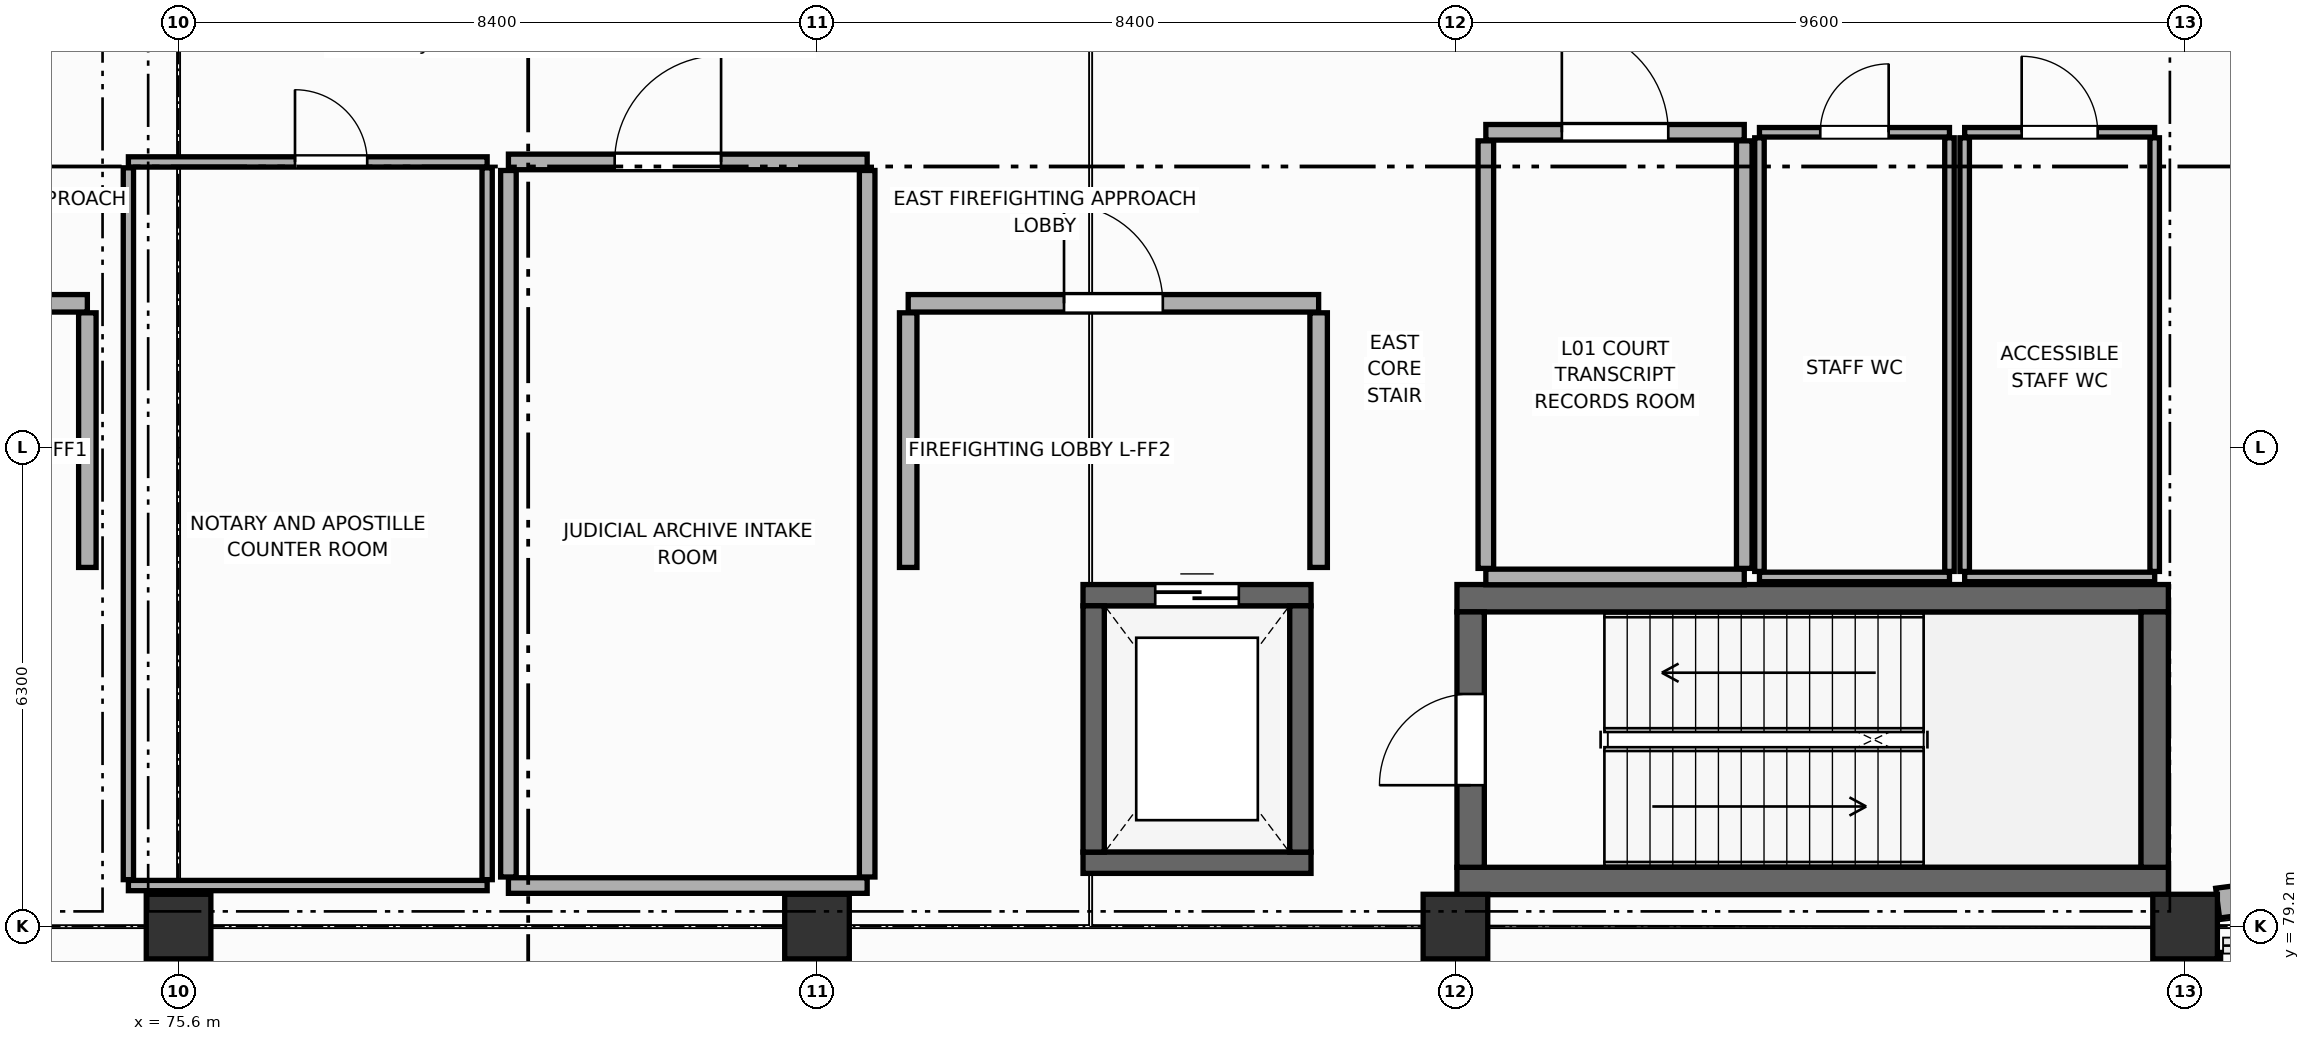
"""IFC4 building model, lengths in metres.
Left out: names, types, materials, properties, quantities, classifications, styles, units other than length and angle.
Written with IfcOpenShell. Run it as: python <this file> out.ifc"""

import sys

from ifc_helpers import new_model, si_unit, direction, frame, frame_2d, origin, origin_2d, place, context, subcontext, project, spatial, rectangle, extrude, element, fill, save


model = new_model("IFC4")
c1 = context("Model", 3, precision=1e-05, world=origin(), true_north=direction((0.0, 1.0)))
c2 = subcontext(c1, "Body", "Model", "MODEL_VIEW")
j1 = project(units=[si_unit("LENGTHUNIT", "METRE"), si_unit("PLANEANGLEUNIT", "RADIAN")], contexts=[c1])
p1 = place(None, origin())
s1 = spatial("IfcSite", under=j1, at=p1, CompositionType="ELEMENT")
p2 = place(p1, origin())
s2 = spatial("IfcBuilding", under=s1, at=p2, CompositionType="ELEMENT")
p3 = place(p2, origin())
s3 = spatial("IfcBuildingStorey", under=s2, at=p3, CompositionType="ELEMENT", Elevation=0.0)
for number, where, z_axis, x_axis in (
    (1, (75.6, 79.2, 0.0), (0.0, 0.0, 1.0), (1.0, 0.0, 0.0)),
    (2, (84.0, 79.2, 0.0), (0.0, 0.0, 1.0), (1.0, 0.0, 0.0)),
    (3, (92.4, 79.2, 0.0), (0.0, 0.0, 1.0), (1.0, 0.0, 0.0)),
    (4, (102.0, 79.2, 0.0), (0.0, 0.0, 1.0), (1.0, 0.0, 0.0)),
):
    element("IfcColumn", number, at=place(p3, frame(where, z_axis=z_axis, x_axis=x_axis)), inside=s3, PredefinedType="COLUMN", context=c2, shape_type="SweptSolid", body=[
        extrude(rectangle(XDim=0.85, YDim=0.85, at=origin_2d()), origin(), (0.0, 0.0, 1.0), 5.4),
    ])
p4 = place(p3, frame((102.428, 79.509, 0.0), z_axis=(0.0, 0.0, 1.0), x_axis=(0.991443994311, 0.130532778046, 0.0)))
e5 = element("IfcWall", 5, at=p4, inside=s3, PredefinedType="ELEMENTEDWALL", context=c2, shape_type="SweptSolid", body=[
    extrude(rectangle(XDim=2.824, YDim=0.395, at=frame_2d((1.412, 0.0))), origin(), (0.0, 0.0, 1.0), 4.27),
])
p5 = place(p4, frame((0.962, 0.0, 0.85)))
e6 = element("IfcOpeningElement", 6, at=p5, cuts=e5, PredefinedType="OPENING", context=c2, shape_type="SweptSolid", body=[
    extrude(rectangle(XDim=0.9, YDim=1.85, at=frame_2d((0.45, 0.925))), frame((0.0, 0.208, 0.0), z_axis=(0.0, -1.0, 0.0), x_axis=(1.0, 0.0, 0.0)), (0.0, 0.0, 1.0), 0.415),
])
for number, where, z_axis, x_axis in (
    (7, (92.42, 83.52, 0.0), (0.0, 0.0, 1.0), (1.0, 0.0, 0.0)),
    (8, (101.78, 79.8, 0.0), (0.0, 0.0, 1.0), (-1.0, 0.0, 0.0)),
):
    element("IfcWall", number, at=place(p3, frame(where, z_axis=z_axis, x_axis=x_axis)), inside=s3, PredefinedType="SHEAR", context=c2, shape_type="SweptSolid", body=[
        extrude(rectangle(XDim=9.36, YDim=0.36, at=frame_2d((4.68, 0.0))), origin(), (0.0, 0.0, 1.0), 5.14),
    ])
p6 = place(p3, frame((92.6, 79.98, 0.0), z_axis=(0.0, 0.0, 1.0), x_axis=(0.0, 1.0, 0.0)))
e9 = element("IfcWall", 9, at=p6, inside=s3, PredefinedType="SHEAR", context=c2, shape_type="SweptSolid", body=[
    extrude(rectangle(XDim=3.36, YDim=0.36, at=frame_2d((1.68, 0.0))), origin(), (0.0, 0.0, 1.0), 5.14),
])
p7 = place(p6, frame((1.08, 0.0, 0.0)))
e10 = element("IfcOpeningElement", 10, at=p7, cuts=e9, PredefinedType="OPENING", context=c2, shape_type="SweptSolid", body=[
    extrude(rectangle(XDim=1.2, YDim=2.2, at=frame_2d((0.6, 1.1))), frame((0.0, 0.19, 0.0), z_axis=(0.0, -1.0, 0.0), x_axis=(1.0, 0.0, 0.0)), (0.0, 0.0, 1.0), 0.38),
])
p8 = place(p3, frame((101.6, 83.34, 0.0), z_axis=(0.0, 0.0, 1.0), x_axis=(0.0, -1.0, 0.0)))
e11 = element("IfcWall", 11, at=p8, inside=s3, PredefinedType="SHEAR", context=c2, shape_type="SweptSolid", body=[
    extrude(rectangle(XDim=3.36, YDim=0.36, at=frame_2d((1.68, 0.0))), origin(), (0.0, 0.0, 1.0), 5.14),
])
p9 = place(p3, frame((87.5, 83.56, 0.0), z_axis=(0.0, 0.0, 1.0), x_axis=(1.0, 0.0, 0.0)))
e12 = element("IfcWall", 12, at=p9, inside=s3, PredefinedType="SHEAR", context=c2, shape_type="SweptSolid", body=[
    extrude(rectangle(XDim=3.0, YDim=0.28, at=frame_2d((1.5, 0.0))), origin(), (0.0, 0.0, 1.0), 5.14),
])
p10 = place(p9, frame((0.95, 0.0, 0.0)))
e13 = element("IfcOpeningElement", 13, at=p10, cuts=e12, PredefinedType="OPENING", context=c2, shape_type="SweptSolid", body=[
    extrude(rectangle(XDim=1.1, YDim=2.2, at=frame_2d((0.55, 1.1))), frame((0.0, 0.15, 0.0), z_axis=(0.0, -1.0, 0.0), x_axis=(1.0, 0.0, 0.0)), (0.0, 0.0, 1.0), 0.3),
])
p11 = place(p3, frame((90.5, 80.04, 0.0), z_axis=(0.0, 0.0, 1.0), x_axis=(-1.0, 0.0, 0.0)))
e14 = element("IfcWall", 14, at=p11, inside=s3, PredefinedType="SHEAR", context=c2, shape_type="SweptSolid", body=[
    extrude(rectangle(XDim=3.0, YDim=0.28, at=frame_2d((1.5, 0.0))), origin(), (0.0, 0.0, 1.0), 5.14),
])
for number, where, z_axis, x_axis in (
    (15, (87.64, 80.18, 0.0), (0.0, 0.0, 1.0), (0.0, 1.0, 0.0)),
    (16, (90.36, 83.42, 0.0), (0.0, 0.0, 1.0), (0.0, -1.0, 0.0)),
):
    element("IfcWall", number, at=place(p3, frame(where, z_axis=z_axis, x_axis=x_axis)), inside=s3, PredefinedType="SHEAR", context=c2, shape_type="SweptSolid", body=[
        extrude(rectangle(XDim=3.24, YDim=0.28, at=frame_2d((1.62, 0.0))), origin(), (0.0, 0.0, 1.0), 5.14),
    ])
p12 = place(p3, frame((69.0, 87.4, 0.0), z_axis=(0.0, 0.0, 1.0), x_axis=(1.0, 0.0, 0.0)))
e17 = element("IfcWall", 17, at=p12, inside=s3, PredefinedType="STANDARD", context=c2, shape_type="SweptSolid", body=[
    extrude(rectangle(XDim=5.4, YDim=0.23, at=frame_2d((2.7, 0.0))), origin(), (0.0, 0.0, 1.0), 5.125),
])
p13 = place(p12, frame((2.05, 0.0, 0.0)))
e18 = element("IfcOpeningElement", 18, at=p13, cuts=e17, PredefinedType="OPENING", context=c2, shape_type="SweptSolid", body=[
    extrude(rectangle(XDim=1.3, YDim=2.2, at=frame_2d((0.65, 1.1))), frame((0.0, 0.125, 0.0), z_axis=(0.0, -1.0, 0.0), x_axis=(1.0, 0.0, 0.0)), (0.0, 0.0, 1.0), 0.25),
])
p14 = place(p3, frame((74.4, 87.275, 0.0), z_axis=(0.0, 0.0, 1.0), x_axis=(0.0, -1.0, 0.0)))
e19 = element("IfcWall", 19, at=p14, inside=s3, PredefinedType="STANDARD", context=c2, shape_type="SweptSolid", body=[
    extrude(rectangle(XDim=3.35, YDim=0.23, at=frame_2d((1.675, 0.0))), origin(), (0.0, 0.0, 1.0), 5.125),
])
p15 = place(p3, frame((85.2, 87.4, 0.0), z_axis=(0.0, 0.0, 1.0), x_axis=(1.0, 0.0, 0.0)))
e20 = element("IfcWall", 20, at=p15, inside=s3, PredefinedType="STANDARD", context=c2, shape_type="SweptSolid", body=[
    extrude(rectangle(XDim=5.4, YDim=0.23, at=frame_2d((2.7, 0.0))), origin(), (0.0, 0.0, 1.0), 4.52),
])
p16 = place(p15, frame((2.05, 0.0, 0.0)))
e21 = element("IfcOpeningElement", 21, at=p16, cuts=e20, PredefinedType="OPENING", context=c2, shape_type="SweptSolid", body=[
    extrude(rectangle(XDim=1.3, YDim=2.2, at=frame_2d((0.65, 1.1))), frame((0.0, 0.125, 0.0), z_axis=(0.0, -1.0, 0.0), x_axis=(1.0, 0.0, 0.0)), (0.0, 0.0, 1.0), 0.25),
])
for number, where, z_axis, x_axis in (
    (22, (85.2, 83.925, 0.0), (0.0, 0.0, 1.0), (0.0, 1.0, 0.0)),
    (23, (90.6, 87.275, 0.0), (0.0, 0.0, 1.0), (0.0, -1.0, 0.0)),
):
    element("IfcWall", number, at=place(p3, frame(where, z_axis=z_axis, x_axis=x_axis)), inside=s3, PredefinedType="STANDARD", context=c2, shape_type="SweptSolid", body=[
        extrude(rectangle(XDim=3.35, YDim=0.23, at=frame_2d((1.675, 0.0))), origin(), (0.0, 0.0, 1.0), 4.52),
    ])
p17 = place(p3, frame((96.4, 89.65, 0.0), z_axis=(0.0, 0.0, 1.0), x_axis=(1.0, 0.0, 0.0)))
e24 = element("IfcWall", 24, at=p17, inside=s3, PredefinedType="PARTITIONING", context=c2, shape_type="SweptSolid", body=[
    extrude(rectangle(XDim=2.5, YDim=0.125, at=frame_2d((1.25, 0.0))), origin(), (0.0, 0.0, 1.0), 5.125),
])
p18 = place(p17, frame((0.8, 0.0, 0.0)))
e25 = element("IfcOpeningElement", 25, at=p18, cuts=e24, PredefinedType="OPENING", context=c2, shape_type="SweptSolid", body=[
    extrude(rectangle(XDim=0.9, YDim=2.1, at=frame_2d((0.45, 1.05))), frame((0.0, 0.073, 0.0), z_axis=(0.0, -1.0, 0.0), x_axis=(1.0, 0.0, 0.0)), (0.0, 0.0, 1.0), 0.145),
])
p19 = place(p3, frame((98.9, 83.8, 0.0), z_axis=(0.0, 0.0, 1.0), x_axis=(-1.0, 0.0, 0.0)))
e26 = element("IfcWall", 26, at=p19, inside=s3, PredefinedType="PARTITIONING", context=c2, shape_type="SweptSolid", body=[
    extrude(rectangle(XDim=2.5, YDim=0.125, at=frame_2d((1.25, 0.0))), origin(), (0.0, 0.0, 1.0), 5.125),
])
for number, where, z_axis, x_axis in (
    (27, (96.4, 83.873, 0.0), (0.0, 0.0, 1.0), (0.0, 1.0, 0.0)),
    (28, (98.9, 89.577, 0.0), (0.0, 0.0, 1.0), (0.0, -1.0, 0.0)),
):
    element("IfcWall", number, at=place(p3, frame(where, z_axis=z_axis, x_axis=x_axis)), inside=s3, PredefinedType="PARTITIONING", context=c2, shape_type="SweptSolid", body=[
        extrude(rectangle(XDim=5.705, YDim=0.125, at=frame_2d((2.853, 0.0))), origin(), (0.0, 0.0, 1.0), 4.52),
    ])
p20 = place(p3, frame((99.1, 89.65, 0.0), z_axis=(0.0, 0.0, 1.0), x_axis=(1.0, 0.0, 0.0)))
e29 = element("IfcWall", 29, at=p20, inside=s3, PredefinedType="PARTITIONING", context=c2, shape_type="SweptSolid", body=[
    extrude(rectangle(XDim=2.5, YDim=0.125, at=frame_2d((1.25, 0.0))), origin(), (0.0, 0.0, 1.0), 4.27),
])
p21 = place(p20, frame((0.75, 0.0, 0.0)))
e30 = element("IfcOpeningElement", 30, at=p21, cuts=e29, PredefinedType="OPENING", context=c2, shape_type="SweptSolid", body=[
    extrude(rectangle(XDim=1.0, YDim=2.1, at=frame_2d((0.5, 1.05))), frame((0.0, 0.073, 0.0), z_axis=(0.0, -1.0, 0.0), x_axis=(1.0, 0.0, 0.0)), (0.0, 0.0, 1.0), 0.145),
])
p22 = place(p3, frame((101.6, 83.8, 0.0), z_axis=(0.0, 0.0, 1.0), x_axis=(-1.0, 0.0, 0.0)))
e31 = element("IfcWall", 31, at=p22, inside=s3, PredefinedType="PARTITIONING", context=c2, shape_type="SweptSolid", body=[
    extrude(rectangle(XDim=2.5, YDim=0.125, at=frame_2d((1.25, 0.0))), origin(), (0.0, 0.0, 1.0), 4.27),
])
p23 = place(p3, frame((99.1, 83.873, 0.0), z_axis=(0.0, 0.0, 1.0), x_axis=(0.0, 1.0, 0.0)))
e32 = element("IfcWall", 32, at=p23, inside=s3, PredefinedType="PARTITIONING", context=c2, shape_type="SweptSolid", body=[
    extrude(rectangle(XDim=5.705, YDim=0.125, at=frame_2d((2.853, 0.0))), origin(), (0.0, 0.0, 1.0), 4.52),
])
p24 = place(p3, frame((101.6, 89.577, 0.0), z_axis=(0.0, 0.0, 1.0), x_axis=(0.0, -1.0, 0.0)))
e33 = element("IfcWall", 33, at=p24, inside=s3, PredefinedType="PARTITIONING", context=c2, shape_type="SweptSolid", body=[
    extrude(rectangle(XDim=5.705, YDim=0.125, at=frame_2d((2.853, 0.0))), origin(), (0.0, 0.0, 1.0), 4.27),
])
p25 = place(p3, frame((92.8, 89.65, 0.0), z_axis=(0.0, 0.0, 1.0), x_axis=(1.0, 0.0, 0.0)))
e34 = element("IfcWall", 34, at=p25, inside=s3, PredefinedType="STANDARD", context=c2, shape_type="SweptSolid", body=[
    extrude(rectangle(XDim=3.4, YDim=0.205, at=frame_2d((1.7, 0.0))), origin(), (0.0, 0.0, 1.0), 4.27),
])
p26 = place(p25, frame((1.0, 0.0, 0.0)))
e35 = element("IfcOpeningElement", 35, at=p26, cuts=e34, PredefinedType="OPENING", context=c2, shape_type="SweptSolid", body=[
    extrude(rectangle(XDim=1.4, YDim=2.25, at=frame_2d((0.7, 1.125))), frame((0.0, 0.113, 0.0), z_axis=(0.0, -1.0, 0.0), x_axis=(1.0, 0.0, 0.0)), (0.0, 0.0, 1.0), 0.225),
])
p27 = place(p3, frame((96.2, 83.8, 0.0), z_axis=(0.0, 0.0, 1.0), x_axis=(-1.0, 0.0, 0.0)))
e36 = element("IfcWall", 36, at=p27, inside=s3, PredefinedType="STANDARD", context=c2, shape_type="SweptSolid", body=[
    extrude(rectangle(XDim=3.4, YDim=0.205, at=frame_2d((1.7, 0.0))), origin(), (0.0, 0.0, 1.0), 4.27),
])
p28 = place(p3, frame((92.8, 83.913, 0.0), z_axis=(0.0, 0.0, 1.0), x_axis=(0.0, 1.0, 0.0)))
e37 = element("IfcWall", 37, at=p28, inside=s3, PredefinedType="STANDARD", context=c2, shape_type="SweptSolid", body=[
    extrude(rectangle(XDim=5.625, YDim=0.205, at=frame_2d((2.812, 0.0))), origin(), (0.0, 0.0, 1.0), 4.27),
])
p29 = place(p3, frame((96.2, 89.538, 0.0), z_axis=(0.0, 0.0, 1.0), x_axis=(0.0, -1.0, 0.0)))
e38 = element("IfcWall", 38, at=p29, inside=s3, PredefinedType="STANDARD", context=c2, shape_type="SweptSolid", body=[
    extrude(rectangle(XDim=5.625, YDim=0.205, at=frame_2d((2.812, 0.0))), origin(), (0.0, 0.0, 1.0), 4.52),
])
p30 = place(p3, frame((102.4, 70.877, 0.0), z_axis=(0.0, 0.0, 1.0), x_axis=(0.0, 1.0, 0.0)))
e39 = element("IfcWall", 39, at=p30, inside=s3, PredefinedType="PARTITIONING", context=c2, shape_type="SweptSolid", body=[
    extrude(rectangle(XDim=7.983, YDim=0.135, at=frame_2d((3.991, 0.0))), origin(), (0.0, 0.0, 1.0), 4.23),
])
p31 = place(p3, frame((74.94, 89.26, 0.0), z_axis=(0.0, 0.0, 1.0), x_axis=(1.0, 0.0, 0.0)))
e40 = element("IfcWall", 40, at=p31, inside=s3, PredefinedType="PARTITIONING", context=c2, shape_type="SweptSolid", body=[
    extrude(rectangle(XDim=4.72, YDim=0.135, at=frame_2d((2.36, 0.0))), origin(), (0.0, 0.0, 1.0), 4.27),
])
p32 = place(p31, frame((2.192, 0.0, 0.0)))
e41 = element("IfcOpeningElement", 41, at=p32, cuts=e40, PredefinedType="OPENING", context=c2, shape_type="SweptSolid", body=[
    extrude(rectangle(XDim=0.95, YDim=2.15, at=frame_2d((0.475, 1.075))), frame((0.0, 0.077, 0.0), z_axis=(0.0, -1.0, 0.0), x_axis=(1.0, 0.0, 0.0)), (0.0, 0.0, 1.0), 0.155),
])
p33 = place(p3, frame((79.66, 79.74, 0.0), z_axis=(0.0, 0.0, 1.0), x_axis=(-1.0, 0.0, 0.0)))
e42 = element("IfcWall", 42, at=p33, inside=s3, PredefinedType="PARTITIONING", context=c2, shape_type="SweptSolid", body=[
    extrude(rectangle(XDim=4.72, YDim=0.135, at=frame_2d((2.36, 0.0))), origin(), (0.0, 0.0, 1.0), 4.27),
])
p34 = place(p3, frame((74.94, 79.817, 0.0), z_axis=(0.0, 0.0, 1.0), x_axis=(0.0, 1.0, 0.0)))
e43 = element("IfcWall", 43, at=p34, inside=s3, PredefinedType="PARTITIONING", context=c2, shape_type="SweptSolid", body=[
    extrude(rectangle(XDim=9.365, YDim=0.135, at=frame_2d((4.683, 0.0))), origin(), (0.0, 0.0, 1.0), 5.125),
])
p35 = place(p3, frame((79.66, 89.183, 0.0), z_axis=(0.0, 0.0, 1.0), x_axis=(0.0, -1.0, 0.0)))
e44 = element("IfcWall", 44, at=p35, inside=s3, PredefinedType="PARTITIONING", context=c2, shape_type="SweptSolid", body=[
    extrude(rectangle(XDim=9.365, YDim=0.135, at=frame_2d((4.683, 0.0))), origin(), (0.0, 0.0, 1.0), 4.52),
])
p36 = place(p3, frame((79.94, 89.26, 0.0), z_axis=(0.0, 0.0, 1.0), x_axis=(1.0, 0.0, 0.0)))
e45 = element("IfcWall", 45, at=p36, inside=s3, PredefinedType="STANDARD", context=c2, shape_type="SweptSolid", body=[
    extrude(rectangle(XDim=4.72, YDim=0.205, at=frame_2d((2.36, 0.0))), origin(), (0.0, 0.0, 1.0), 4.27),
])
p37 = place(p36, frame((1.398, 0.0, 0.0)))
e46 = element("IfcOpeningElement", 46, at=p37, cuts=e45, PredefinedType="OPENING", context=c2, shape_type="SweptSolid", body=[
    extrude(rectangle(XDim=1.4, YDim=2.25, at=frame_2d((0.7, 1.125))), frame((0.0, 0.113, 0.0), z_axis=(0.0, -1.0, 0.0), x_axis=(1.0, 0.0, 0.0)), (0.0, 0.0, 1.0), 0.225),
])
p38 = place(p3, frame((84.66, 79.74, 0.0), z_axis=(0.0, 0.0, 1.0), x_axis=(-1.0, 0.0, 0.0)))
e47 = element("IfcWall", 47, at=p38, inside=s3, PredefinedType="STANDARD", context=c2, shape_type="SweptSolid", body=[
    extrude(rectangle(XDim=4.72, YDim=0.205, at=frame_2d((2.36, 0.0))), origin(), (0.0, 0.0, 1.0), 4.27),
])
for number, where, z_axis, x_axis in (
    (48, (79.94, 79.853, 0.0), (0.0, 0.0, 1.0), (0.0, 1.0, 0.0)),
    (49, (84.66, 89.147, 0.0), (0.0, 0.0, 1.0), (0.0, -1.0, 0.0)),
):
    element("IfcWall", number, at=place(p3, frame(where, z_axis=z_axis, x_axis=x_axis)), inside=s3, PredefinedType="STANDARD", context=c2, shape_type="SweptSolid", body=[
        extrude(rectangle(XDim=9.295, YDim=0.205, at=frame_2d((4.647, 0.0))), origin(), (0.0, 0.0, 1.0), 4.52),
    ])
p39 = place(p7, origin())
e50 = element("IfcDoor", 50, at=p39, inside=s3, OperationType="SINGLE_SWING_LEFT", PredefinedType="DOOR", context=c2, shape_type="SweptSolid", body=[
    extrude(rectangle(XDim=1.2, YDim=2.2, at=frame_2d((0.6, 1.1))), frame((0.0, 0.025, 0.0), z_axis=(0.0, -1.0, 0.0), x_axis=(1.0, 0.0, 0.0)), (0.0, 0.0, 1.0), 0.05),
])
fill(e10, e50)
p40 = place(p10, origin())
e51 = element("IfcDoor", 51, at=p40, inside=s3, OperationType="DOUBLE_DOOR_SLIDING", PredefinedType="DOOR", context=c2, shape_type="SweptSolid", body=[
    extrude(rectangle(XDim=1.1, YDim=2.2, at=frame_2d((0.55, 1.1))), frame((0.0, 0.025, 0.0), z_axis=(0.0, -1.0, 0.0), x_axis=(1.0, 0.0, 0.0)), (0.0, 0.0, 1.0), 0.05),
])
fill(e13, e51)
p41 = place(p16, origin())
e52 = element("IfcDoor", 52, at=p41, inside=s3, OperationType="SINGLE_SWING_LEFT", PredefinedType="DOOR", context=c2, shape_type="SweptSolid", body=[
    extrude(rectangle(XDim=1.3, YDim=2.2, at=frame_2d((0.65, 1.1))), frame((0.0, 0.025, 0.0), z_axis=(0.0, -1.0, 0.0), x_axis=(1.0, 0.0, 0.0)), (0.0, 0.0, 1.0), 0.05),
])
fill(e21, e52)
p42 = place(p18, origin())
e53 = element("IfcDoor", 53, at=p42, inside=s3, OperationType="SINGLE_SWING_RIGHT", PredefinedType="DOOR", context=c2, shape_type="SweptSolid", body=[
    extrude(rectangle(XDim=0.9, YDim=2.1, at=frame_2d((0.45, 1.05))), frame((0.0, 0.025, 0.0), z_axis=(0.0, -1.0, 0.0), x_axis=(1.0, 0.0, 0.0)), (0.0, 0.0, 1.0), 0.05),
])
fill(e25, e53)
p43 = place(p21, origin())
e54 = element("IfcDoor", 54, at=p43, inside=s3, OperationType="SINGLE_SWING_LEFT", PredefinedType="DOOR", context=c2, shape_type="SweptSolid", body=[
    extrude(rectangle(XDim=1.0, YDim=2.1, at=frame_2d((0.5, 1.05))), frame((0.0, 0.025, 0.0), z_axis=(0.0, -1.0, 0.0), x_axis=(1.0, 0.0, 0.0)), (0.0, 0.0, 1.0), 0.05),
])
fill(e30, e54)
p44 = place(p26, origin())
e55 = element("IfcDoor", 55, at=p44, inside=s3, OperationType="SINGLE_SWING_LEFT", PredefinedType="DOOR", context=c2, shape_type="SweptSolid", body=[
    extrude(rectangle(XDim=1.4, YDim=2.25, at=frame_2d((0.7, 1.125))), frame((0.0, 0.025, 0.0), z_axis=(0.0, -1.0, 0.0), x_axis=(1.0, 0.0, 0.0)), (0.0, 0.0, 1.0), 0.05),
])
fill(e35, e55)
p45 = place(p32, origin())
e56 = element("IfcDoor", 56, at=p45, inside=s3, OperationType="SINGLE_SWING_LEFT", PredefinedType="DOOR", context=c2, shape_type="SweptSolid", body=[
    extrude(rectangle(XDim=0.95, YDim=2.15, at=frame_2d((0.475, 1.075))), frame((0.0, 0.025, 0.0), z_axis=(0.0, -1.0, 0.0), x_axis=(1.0, 0.0, 0.0)), (0.0, 0.0, 1.0), 0.05),
])
fill(e41, e56)
p46 = place(p37, origin())
e57 = element("IfcDoor", 57, at=p46, inside=s3, OperationType="SINGLE_SWING_RIGHT", PredefinedType="DOOR", context=c2, shape_type="SweptSolid", body=[
    extrude(rectangle(XDim=1.4, YDim=2.25, at=frame_2d((0.7, 1.125))), frame((0.0, 0.025, 0.0), z_axis=(0.0, -1.0, 0.0), x_axis=(1.0, 0.0, 0.0)), (0.0, 0.0, 1.0), 0.05),
])
fill(e46, e57)
save(model, sys.argv[1])
